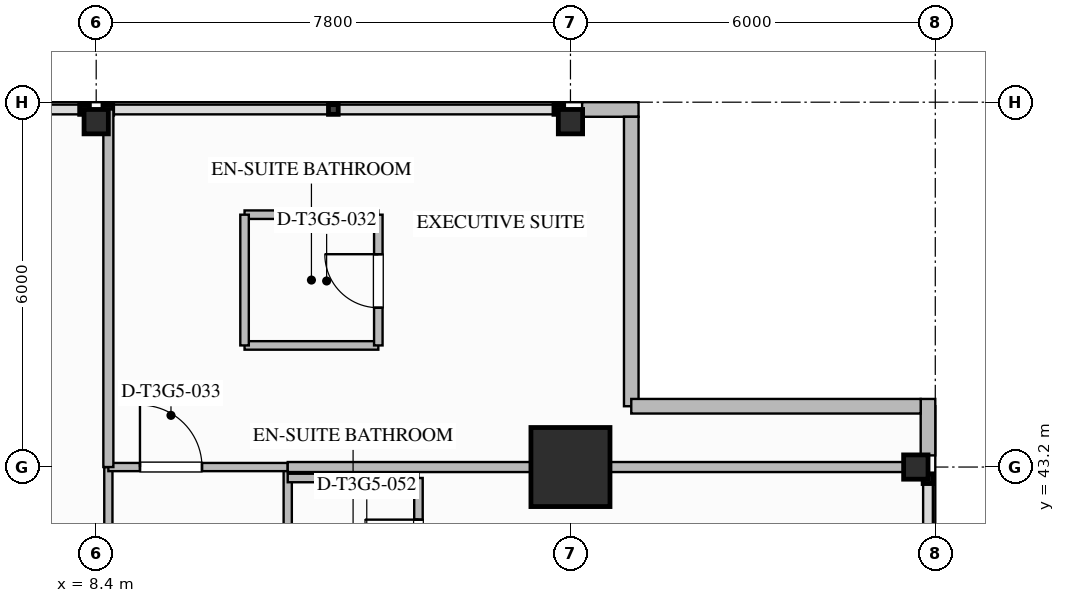
"""IFC4 building model, lengths in metres.
Left out: names, types, materials, properties, quantities, classifications, styles, units other than length and angle.
Written with IfcOpenShell. Run it as: python <this file> out.ifc"""

import sys

from ifc_helpers import new_model, si_unit, direction, frame, frame_2d, origin, origin_2d, place, context, subcontext, project, spatial, rectangle, i_section, extrude, element, fill, save


model = new_model("IFC4")
c1 = context("Model", 3, precision=1e-05, world=origin(), true_north=direction((0.0, 1.0)))
c2 = subcontext(c1, "Body", "Model", "MODEL_VIEW")
j1 = project(units=[si_unit("LENGTHUNIT", "METRE"), si_unit("PLANEANGLEUNIT", "RADIAN")], contexts=[c1])
p1 = place(None, origin())
s1 = spatial("IfcSite", under=j1, at=p1, CompositionType="ELEMENT")
p2 = place(p1, origin())
s2 = spatial("IfcBuilding", under=s1, at=p2, CompositionType="ELEMENT")
p3 = place(p2, frame((0.0, 0.0, 193.0)))
s3 = spatial("IfcBuildingStorey", under=s2, at=p3, CompositionType="ELEMENT", Elevation=193.0)
p4 = place(p3, frame((16.2, 43.2, 0.0), z_axis=(0.0, 0.0, 1.0), x_axis=(1.0, 0.0, 0.0)))
e1 = element("IfcColumn", 1, at=p4, inside=s3, PredefinedType="COLUMN", context=c2, shape_type="SweptSolid", body=[
    extrude(rectangle(XDim=1.3, YDim=1.3, at=origin_2d()), origin(), (0.0, 0.0, 1.0), 3.55),
])
for number, where, z_axis, x_axis in (
    (2, (21.88, 43.2, 0.0), (0.0, 0.0, 1.0), (1.0, 0.0, 0.0)),
    (3, (8.4, 48.88, 0.0), (0.0, 0.0, 1.0), (0.0, 1.0, 0.0)),
    (4, (16.2, 48.88, 0.0), (0.0, 0.0, 1.0), (0.0, 1.0, 0.0)),
):
    element("IfcColumn", number, at=place(p3, frame(where, z_axis=z_axis, x_axis=x_axis)), inside=s3, PredefinedType="COLUMN", context=c2, shape_type="SweptSolid", body=[
        extrude(i_section(OverallWidth=0.401, OverallDepth=0.399, WebThickness=0.025, FlangeThickness=0.04, FilletRadius=0.025, at=origin_2d()), origin(), (0.0, 0.0, 1.0), 3.547),
    ])
for number, where, z_axis, x_axis in (
    (5, (22.08, 44.32, 0.0), (0.0, 0.0, 1.0), (0.0, -1.0, 0.0)),
    (6, (16.392, 49.08, 0.0), (0.0, 0.0, 1.0), (1.0, 0.0, 0.0)),
):
    element("IfcWall", number, at=place(p3, frame(where, z_axis=z_axis, x_axis=x_axis)), inside=s3, PredefinedType="STANDARD", context=c2, shape_type="SweptSolid", body=[
        extrude(rectangle(XDim=0.928, YDim=0.24, at=frame_2d((0.464, 0.0))), origin(), (0.0, 0.0, 1.0), 3.29),
    ])
for number, where, z_axis, x_axis in (
    (7, (17.2, 48.96, 0.0), (0.0, 0.0, 1.0), (0.0, -1.0, 0.0)),
    (8, (17.2, 44.2, 0.0), (0.0, 0.0, 1.0), (1.0, 0.0, 0.0)),
):
    element("IfcWall", number, at=place(p3, frame(where, z_axis=z_axis, x_axis=x_axis)), inside=s3, PredefinedType="STANDARD", context=c2, shape_type="SweptSolid", body=[
        extrude(rectangle(XDim=4.76, YDim=0.24, at=frame_2d((2.38, 0.0))), origin(), (0.0, 0.0, 1.0), 3.29),
    ])
p5 = place(p3, frame((8.6, 38.2, 0.0), z_axis=(0.0, 0.0, 1.0), x_axis=(0.0, 1.0, 0.0)))
e9 = element("IfcWall", 9, at=p5, inside=s3, PredefinedType="PARTITIONING", context=c2, shape_type="SweptSolid", body=[
    extrude(rectangle(XDim=5.0, YDim=0.135, at=frame_2d((2.5, 0.0))), origin(), (0.0, 0.0, 1.0), 2.667),
])
p6 = place(p3, frame((11.55, 10.8, 0.0), z_axis=(0.0, 0.0, 1.0), x_axis=(0.0, 1.0, 0.0)))
e10 = element("IfcWall", 10, at=p6, inside=s3, PredefinedType="PARTITIONING", context=c2, shape_type="SweptSolid", body=[
    extrude(rectangle(XDim=32.4, YDim=0.135, at=frame_2d((16.2, 0.0))), origin(), (0.0, 0.0, 1.0), 3.29),
])
p7 = place(p6, frame((1.545, 0.0, 0.0)))
e11 = element("IfcOpeningElement", 11, at=p7, cuts=e10, PredefinedType="OPENING", context=c2, shape_type="SweptSolid", body=[
    extrude(rectangle(XDim=0.96, YDim=2.15, at=frame_2d((0.48, 1.075))), frame((0.0, 0.077, 0.0), z_axis=(0.0, -1.0, 0.0), x_axis=(1.0, 0.0, 0.0)), (0.0, 0.0, 1.0), 0.155),
])
p8 = place(p6, frame((9.48, 0.0, 0.0)))
e12 = element("IfcOpeningElement", 12, at=p8, cuts=e10, PredefinedType="OPENING", context=c2, shape_type="SweptSolid", body=[
    extrude(rectangle(XDim=1.02, YDim=2.15, at=frame_2d((0.51, 1.075))), frame((0.0, 0.077, 0.0), z_axis=(0.0, -1.0, 0.0), x_axis=(1.0, 0.0, 0.0)), (0.0, 0.0, 1.0), 0.155),
])
p9 = place(p6, frame((14.445, 0.0, 0.0)))
e13 = element("IfcOpeningElement", 13, at=p9, cuts=e10, PredefinedType="OPENING", context=c2, shape_type="SweptSolid", body=[
    extrude(rectangle(XDim=0.96, YDim=2.15, at=frame_2d((0.48, 1.075))), frame((0.0, 0.077, 0.0), z_axis=(0.0, -1.0, 0.0), x_axis=(1.0, 0.0, 0.0)), (0.0, 0.0, 1.0), 0.155),
])
p10 = place(p6, frame((21.3, 0.0, 0.0)))
e14 = element("IfcOpeningElement", 14, at=p10, cuts=e10, PredefinedType="OPENING", context=c2, shape_type="SweptSolid", body=[
    extrude(rectangle(XDim=1.02, YDim=2.15, at=frame_2d((0.51, 1.075))), frame((0.0, 0.077, 0.0), z_axis=(0.0, -1.0, 0.0), x_axis=(1.0, 0.0, 0.0)), (0.0, 0.0, 1.0), 0.155),
])
p11 = place(p6, frame((26.925, 0.0, 0.0)))
e15 = element("IfcOpeningElement", 15, at=p11, cuts=e10, PredefinedType="OPENING", context=c2, shape_type="SweptSolid", body=[
    extrude(rectangle(XDim=0.96, YDim=2.15, at=frame_2d((0.48, 1.075))), frame((0.0, 0.077, 0.0), z_axis=(0.0, -1.0, 0.0), x_axis=(1.0, 0.0, 0.0)), (0.0, 0.0, 1.0), 0.155),
])
p12 = place(p3, frame((8.6, 43.2, 0.0), z_axis=(0.0, 0.0, 1.0), x_axis=(1.0, 0.0, 0.0)))
e16 = element("IfcWall", 16, at=p12, inside=s3, PredefinedType="PARTITIONING", context=c2, shape_type="SweptSolid", body=[
    extrude(rectangle(XDim=2.95, YDim=0.135, at=frame_2d((1.475, 0.0))), origin(), (0.0, 0.0, 1.0), 2.58),
])
p13 = place(p12, frame((0.52, 0.0, 0.0)))
e17 = element("IfcOpeningElement", 17, at=p13, cuts=e16, PredefinedType="OPENING", context=c2, shape_type="SweptSolid", body=[
    extrude(rectangle(XDim=1.02, YDim=2.15, at=frame_2d((0.51, 1.075))), frame((0.0, 0.077, 0.0), z_axis=(0.0, -1.0, 0.0), x_axis=(1.0, 0.0, 0.0)), (0.0, 0.0, 1.0), 0.155),
])
p14 = place(p3, frame((8.6, 43.2, 0.0), z_axis=(0.0, 0.0, 1.0), x_axis=(0.0, 1.0, 0.0)))
e18 = element("IfcWall", 18, at=p14, inside=s3, PredefinedType="PARTITIONING", context=c2, shape_type="SweptSolid", body=[
    extrude(rectangle(XDim=5.88, YDim=0.165, at=frame_2d((2.94, 0.0))), origin(), (0.0, 0.0, 1.0), 2.58),
])
p15 = place(p3, frame((11.55, 43.2, 0.0), z_axis=(0.0, 0.0, 1.0), x_axis=(1.0, 0.0, 0.0)))
e19 = element("IfcWall", 19, at=p15, inside=s3, PredefinedType="PARTITIONING", context=c2, shape_type="SweptSolid", body=[
    extrude(rectangle(XDim=10.53, YDim=0.165, at=frame_2d((5.265, 0.0))), origin(), (0.0, 0.0, 1.0), 2.58),
])
for number, where, z_axis, x_axis in (
    (20, (10.84, 45.2, 0.0), (0.0, 0.0, 1.0), (1.0, 0.0, 0.0)),
    (21, (10.84, 47.35, 0.0), (0.0, 0.0, 1.0), (1.0, 0.0, 0.0)),
):
    element("IfcWall", number, at=place(p3, frame(where, z_axis=z_axis, x_axis=x_axis)), inside=s3, PredefinedType="PLUMBINGWALL", context=c2, shape_type="SweptSolid", body=[
        extrude(rectangle(XDim=2.2, YDim=0.14, at=frame_2d((1.1, 0.0))), origin(), (0.0, 0.0, 1.0), 3.29),
    ])
p16 = place(p3, frame((10.84, 45.2, 0.0), z_axis=(0.0, 0.0, 1.0), x_axis=(0.0, 1.0, 0.0)))
e22 = element("IfcWall", 22, at=p16, inside=s3, PredefinedType="PLUMBINGWALL", context=c2, shape_type="SweptSolid", body=[
    extrude(rectangle(XDim=2.15, YDim=0.14, at=frame_2d((1.075, 0.0))), origin(), (0.0, 0.0, 1.0), 3.29),
])
p17 = place(p3, frame((13.04, 45.2, 0.0), z_axis=(0.0, 0.0, 1.0), x_axis=(0.0, 1.0, 0.0)))
e23 = element("IfcWall", 23, at=p17, inside=s3, PredefinedType="PLUMBINGWALL", context=c2, shape_type="SweptSolid", body=[
    extrude(rectangle(XDim=2.15, YDim=0.14, at=frame_2d((1.075, 0.0))), origin(), (0.0, 0.0, 1.0), 3.29),
])
p18 = place(p17, frame((0.62, 0.0, 0.0)))
e24 = element("IfcOpeningElement", 24, at=p18, cuts=e23, PredefinedType="OPENING", context=c2, shape_type="SweptSolid", body=[
    extrude(rectangle(XDim=0.88, YDim=2.1, at=frame_2d((0.44, 1.05))), frame((0.0, 0.08, 0.0), z_axis=(0.0, -1.0, 0.0), x_axis=(1.0, 0.0, 0.0)), (0.0, 0.0, 1.0), 0.16),
])
p19 = place(p3, frame((11.55, 43.02, 0.0), z_axis=(0.0, 0.0, 1.0), x_axis=(1.0, 0.0, 0.0)))
e25 = element("IfcWall", 25, at=p19, inside=s3, PredefinedType="PLUMBINGWALL", context=c2, shape_type="SweptSolid", body=[
    extrude(rectangle(XDim=2.15, YDim=0.14, at=frame_2d((1.075, 0.0))), origin(), (0.0, 0.0, 1.0), 2.58),
])
p20 = place(p3, frame((13.7, 40.77, 0.0), z_axis=(0.0, 0.0, 1.0), x_axis=(0.0, 1.0, 0.0)))
e26 = element("IfcWall", 26, at=p20, inside=s3, PredefinedType="PLUMBINGWALL", context=c2, shape_type="SweptSolid", body=[
    extrude(rectangle(XDim=2.25, YDim=0.14, at=frame_2d((1.125, 0.0))), origin(), (0.0, 0.0, 1.0), 3.29),
])
p21 = place(p20, frame((0.685, 0.0, 0.0)))
e27 = element("IfcOpeningElement", 27, at=p21, cuts=e26, PredefinedType="OPENING", context=c2, shape_type="SweptSolid", body=[
    extrude(rectangle(XDim=0.88, YDim=2.1, at=frame_2d((0.44, 1.05))), frame((0.0, 0.08, 0.0), z_axis=(0.0, -1.0, 0.0), x_axis=(1.0, 0.0, 0.0)), (0.0, 0.0, 1.0), 0.16),
])
p22 = place(p18, origin())
e28 = element("IfcDoor", 28, at=p22, inside=s3, OperationType="SINGLE_SWING_RIGHT", PredefinedType="DOOR", context=c2, shape_type="SweptSolid", body=[
    extrude(rectangle(XDim=0.88, YDim=2.1, at=frame_2d((0.44, 1.05))), frame((0.0, 0.025, 0.0), z_axis=(0.0, -1.0, 0.0), x_axis=(1.0, 0.0, 0.0)), (0.0, 0.0, 1.0), 0.05),
])
fill(e24, e28)
p23 = place(p13, origin())
e29 = element("IfcDoor", 29, at=p23, inside=s3, OperationType="SINGLE_SWING_LEFT", PredefinedType="DOOR", context=c2, shape_type="SweptSolid", body=[
    extrude(rectangle(XDim=1.02, YDim=2.15, at=frame_2d((0.51, 1.075))), frame((0.0, 0.025, 0.0), z_axis=(0.0, -1.0, 0.0), x_axis=(1.0, 0.0, 0.0)), (0.0, 0.0, 1.0), 0.05),
])
fill(e17, e29)
p24 = place(p21, origin())
e30 = element("IfcDoor", 30, at=p24, inside=s3, OperationType="SINGLE_SWING_RIGHT", PredefinedType="DOOR", context=c2, shape_type="SweptSolid", body=[
    extrude(rectangle(XDim=0.88, YDim=2.1, at=frame_2d((0.44, 1.05))), frame((0.0, 0.025, 0.0), z_axis=(0.0, -1.0, 0.0), x_axis=(1.0, 0.0, 0.0)), (0.0, 0.0, 1.0), 0.05),
])
fill(e27, e30)
save(model, sys.argv[1])
